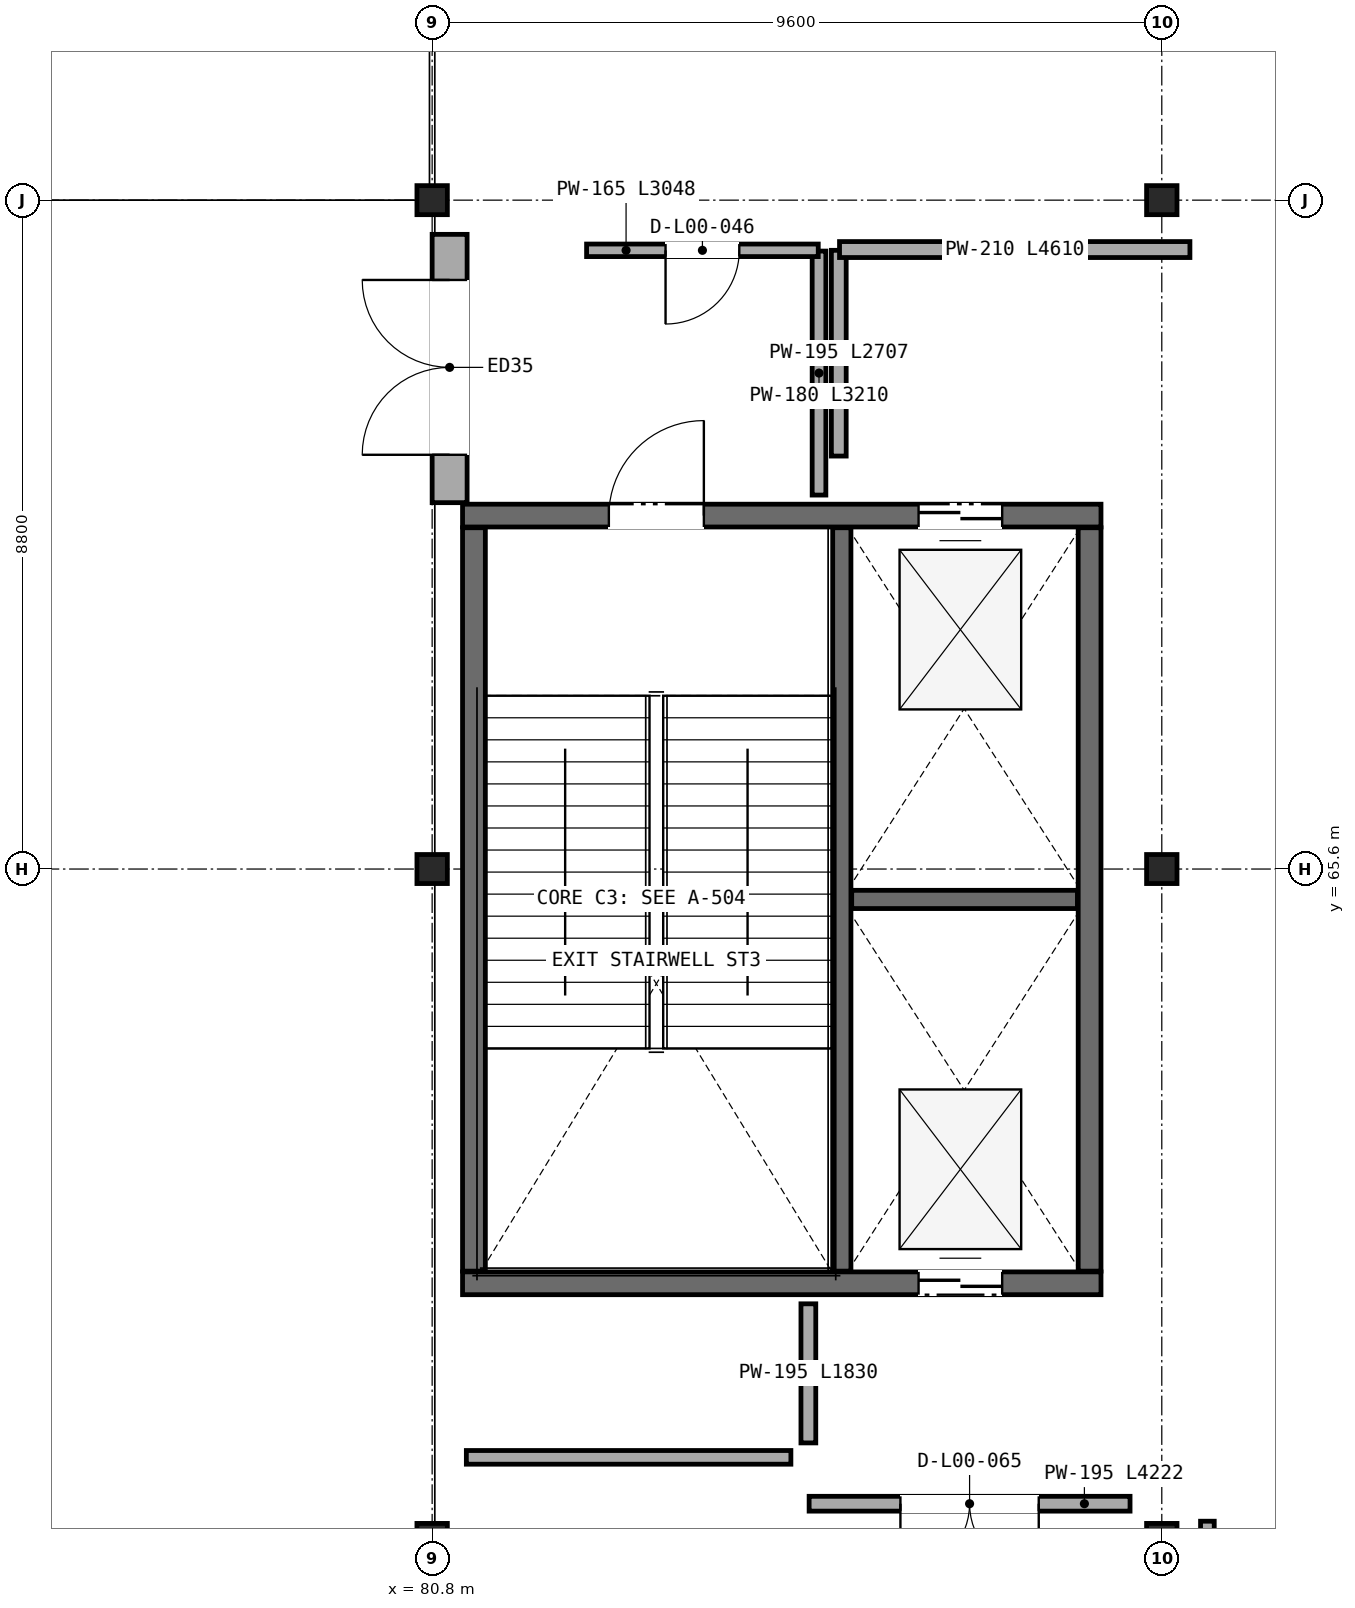
"""IFC4 building model, lengths in metres.
Left out: names, types, materials, properties, quantities, classifications, styles, units other than length and angle.
Written with IfcOpenShell. Run it as: python <this file> out.ifc"""

import sys

from ifc_helpers import new_model, si_unit, direction, frame, frame_2d, origin, origin_2d, place, context, subcontext, project, spatial, rectangle, i_section, extrude, element, fill, save


model = new_model("IFC4")
c1 = context("Model", 3, precision=1e-05, world=origin(), true_north=direction((0.0, 1.0)))
c2 = subcontext(c1, "Body", "Model", "MODEL_VIEW")
j1 = project(units=[si_unit("LENGTHUNIT", "METRE"), si_unit("PLANEANGLEUNIT", "RADIAN")], contexts=[c1])
p1 = place(None, origin())
s1 = spatial("IfcSite", under=j1, at=p1, CompositionType="ELEMENT")
p2 = place(p1, origin())
s2 = spatial("IfcBuilding", under=s1, at=p2, CompositionType="ELEMENT")
p3 = place(p2, origin())
s3 = spatial("IfcBuildingStorey", under=s2, at=p3, CompositionType="ELEMENT", Elevation=0.0)
for number, where, z_axis, x_axis in (
    (1, (90.4, 56.8, 0.0), (0.0, 0.0, 1.0), (1.0, 0.0, 0.0)),
    (2, (90.4, 65.6, 0.0), (0.0, 0.0, 1.0), (1.0, 0.0, 0.0)),
    (3, (90.4, 74.4, 0.0), (0.0, 0.0, 1.0), (1.0, 0.0, 0.0)),
    (4, (80.8, 56.8, 0.0), (0.0, 0.0, 1.0), (1.0, 0.0, 0.0)),
    (5, (80.8, 65.6, 0.0), (0.0, 0.0, 1.0), (1.0, 0.0, 0.0)),
    (6, (80.8, 74.4, 0.0), (0.0, 0.0, 1.0), (1.0, 0.0, 0.0)),
):
    element("IfcColumn", number, at=place(p3, frame(where, z_axis=z_axis, x_axis=x_axis)), inside=s3, PredefinedType="COLUMN", context=c2, shape_type="SweptSolid", body=[
        extrude(i_section(OverallWidth=0.4, OverallDepth=0.382, WebThickness=0.025, FlangeThickness=0.036, at=origin_2d()), origin(), (0.0, 0.0, 1.0), 5.6),
    ])
p4 = place(p3, frame((81.03, 73.95, 0.0), z_axis=(0.0, 0.0, 1.0), x_axis=(0.0, -1.0, 0.0)))
e7 = element("IfcWall", 7, at=p4, inside=s3, PredefinedType="SOLIDWALL", context=c2, shape_type="SweptSolid", body=[
    extrude(rectangle(XDim=3.53, YDim=0.46, at=frame_2d((1.765, 0.0))), origin(), (0.0, 0.0, 1.0), 4.8),
])
p5 = place(p4, frame((0.6, 0.0, 0.0)))
e8 = element("IfcOpeningElement", 8, at=p5, cuts=e7, PredefinedType="OPENING", context=c2, shape_type="SweptSolid", body=[
    extrude(rectangle(XDim=2.3, YDim=2.4, at=frame_2d((1.15, 1.2))), frame((0.0, 0.24, 0.0), z_axis=(0.0, -1.0, 0.0), x_axis=(1.0, 0.0, 0.0)), (0.0, 0.0, 1.0), 0.48),
])
p6 = place(p3, frame((81.2, 60.15, 0.0), z_axis=(0.0, 0.0, 1.0), x_axis=(1.0, 0.0, 0.0)))
e9 = element("IfcWall", 9, at=p6, inside=s3, PredefinedType="SHEAR", context=c2, shape_type="SweptSolid", body=[
    extrude(rectangle(XDim=8.4, YDim=0.3, at=frame_2d((4.2, 0.0))), origin(), (0.0, 0.0, 1.0), 5.345),
])
p7 = place(p6, frame((6.0, 0.0, 0.0)))
e10 = element("IfcOpeningElement", 10, at=p7, cuts=e9, PredefinedType="OPENING", context=c2, shape_type="SweptSolid", body=[
    extrude(rectangle(XDim=1.1, YDim=2.2, at=frame_2d((0.55, 1.1))), frame((0.0, 0.16, 0.0), z_axis=(0.0, -1.0, 0.0), x_axis=(1.0, 0.0, 0.0)), (0.0, 0.0, 1.0), 0.32),
])
p8 = place(p3, frame((89.6, 70.25, 0.0), z_axis=(0.0, 0.0, 1.0), x_axis=(-1.0, 0.0, 0.0)))
e11 = element("IfcWall", 11, at=p8, inside=s3, PredefinedType="SHEAR", context=c2, shape_type="SweptSolid", body=[
    extrude(rectangle(XDim=8.4, YDim=0.3, at=frame_2d((4.2, 0.0))), origin(), (0.0, 0.0, 1.0), 5.345),
])
p9 = place(p8, frame((5.225, 0.0, 0.0)))
e12 = element("IfcOpeningElement", 12, at=p9, cuts=e11, PredefinedType="OPENING", context=c2, shape_type="SweptSolid", body=[
    extrude(rectangle(XDim=1.25, YDim=2.2, at=frame_2d((0.625, 1.1))), frame((0.0, 0.16, 0.0), z_axis=(0.0, -1.0, 0.0), x_axis=(1.0, 0.0, 0.0)), (0.0, 0.0, 1.0), 0.32),
])
p10 = place(p8, frame((1.3, 0.0, 0.0)))
e13 = element("IfcOpeningElement", 13, at=p10, cuts=e11, PredefinedType="OPENING", context=c2, shape_type="SweptSolid", body=[
    extrude(rectangle(XDim=1.1, YDim=2.2, at=frame_2d((0.55, 1.1))), frame((0.0, 0.16, 0.0), z_axis=(0.0, -1.0, 0.0), x_axis=(1.0, 0.0, 0.0)), (0.0, 0.0, 1.0), 0.32),
])
for number, where, z_axis, x_axis in (
    (14, (89.45, 60.31, 0.0), (0.0, 0.0, 1.0), (0.0, 1.0, 0.0)),
    (15, (81.35, 70.09, 0.0), (0.0, 0.0, 1.0), (0.0, -1.0, 0.0)),
):
    element("IfcWall", number, at=place(p3, frame(where, z_axis=z_axis, x_axis=x_axis)), inside=s3, PredefinedType="SHEAR", context=c2, shape_type="SweptSolid", body=[
        extrude(rectangle(XDim=9.78, YDim=0.3, at=frame_2d((4.89, 0.0))), origin(), (0.0, 0.0, 1.0), 5.345),
    ])
p11 = place(p3, frame((86.19, 60.31, 0.0), z_axis=(0.0, 0.0, 1.0), x_axis=(0.0, 1.0, 0.0)))
e16 = element("IfcWall", 16, at=p11, inside=s3, PredefinedType="SOLIDWALL", context=c2, shape_type="SweptSolid", body=[
    extrude(rectangle(XDim=9.78, YDim=0.24, at=frame_2d((4.89, 0.0))), origin(), (0.0, 0.0, 1.0), 5.345),
])
p12 = place(p3, frame((86.32, 65.2, 0.0), z_axis=(0.0, 0.0, 1.0), x_axis=(1.0, 0.0, 0.0)))
e17 = element("IfcWall", 17, at=p12, inside=s3, PredefinedType="SOLIDWALL", context=c2, shape_type="SweptSolid", body=[
    extrude(rectangle(XDim=2.97, YDim=0.24, at=frame_2d((1.485, 0.0))), origin(), (0.0, 0.0, 1.0), 5.345),
])
p13 = place(p3, frame((86.15, 73.74, 0.0), z_axis=(0.0, 0.0, 1.0), x_axis=(0.0, -1.0, 0.0)))
e18 = element("IfcWall", 18, at=p13, inside=s3, PredefinedType="PARTITIONING", context=c2, shape_type="SweptSolid", body=[
    extrude(rectangle(XDim=2.707, YDim=0.195, at=frame_2d((1.354, 0.0))), origin(), (0.0, 0.0, 1.0), 5.23),
])
p14 = place(p3, frame((85.89, 70.52, 0.0), z_axis=(0.0, 0.0, 1.0), x_axis=(0.0, 1.0, 0.0)))
e19 = element("IfcWall", 19, at=p14, inside=s3, PredefinedType="PARTITIONING", context=c2, shape_type="SweptSolid", body=[
    extrude(rectangle(XDim=3.21, YDim=0.18, at=frame_2d((1.605, 0.0))), origin(), (0.0, 0.0, 1.0), 5.23),
])
p15 = place(p3, frame((85.88, 73.74, 0.0), z_axis=(0.0, 0.0, 1.0), x_axis=(-1.0, 0.0, 0.0)))
e20 = element("IfcWall", 20, at=p15, inside=s3, PredefinedType="PARTITIONING", context=c2, shape_type="SweptSolid", body=[
    extrude(rectangle(XDim=3.048, YDim=0.165, at=frame_2d((1.524, 0.0))), origin(), (0.0, 0.0, 1.0), 5.23),
])
p16 = place(p15, frame((1.039, 0.0, 0.0)))
e21 = element("IfcOpeningElement", 21, at=p16, cuts=e20, PredefinedType="OPENING", context=c2, shape_type="SweptSolid", body=[
    extrude(rectangle(XDim=0.97, YDim=2.16, at=frame_2d((0.485, 1.08))), frame((0.0, 0.093, 0.0), z_axis=(0.0, -1.0, 0.0), x_axis=(1.0, 0.0, 0.0)), (0.0, 0.0, 1.0), 0.185),
])
p17 = place(p3, frame((85.76, 57.25, 0.0), z_axis=(0.0, 0.0, 1.0), x_axis=(1.0, 0.0, 0.0)))
e22 = element("IfcWall", 22, at=p17, inside=s3, PredefinedType="PARTITIONING", context=c2, shape_type="SweptSolid", body=[
    extrude(rectangle(XDim=4.222, YDim=0.195, at=frame_2d((2.111, 0.0))), origin(), (0.0, 0.0, 1.0), 5.23),
])
p18 = place(p17, frame((1.201, 0.0, 0.0)))
e23 = element("IfcOpeningElement", 23, at=p18, cuts=e22, PredefinedType="OPENING", context=c2, shape_type="SweptSolid", body=[
    extrude(rectangle(XDim=1.82, YDim=2.34, at=frame_2d((0.91, 1.17))), frame((0.0, 0.107, 0.0), z_axis=(0.0, -1.0, 0.0), x_axis=(1.0, 0.0, 0.0)), (0.0, 0.0, 1.0), 0.215),
])
p19 = place(p3, frame((91.0, 57.02, 0.0), z_axis=(0.0, 0.0, 1.0), x_axis=(0.0, -1.0, 0.0)))
e24 = element("IfcWall", 24, at=p19, inside=s3, PredefinedType="PARTITIONING", context=c2, shape_type="SweptSolid", body=[
    extrude(rectangle(XDim=2.54, YDim=0.18, at=frame_2d((1.27, 0.0))), origin(), (0.0, 0.0, 1.0), 4.708),
])
p20 = place(p3, frame((90.77, 73.75, 0.0), z_axis=(0.0, 0.0, 1.0), x_axis=(-1.0, 0.0, 0.0)))
e25 = element("IfcWall", 25, at=p20, inside=s3, PredefinedType="PARTITIONING", context=c2, shape_type="SweptSolid", body=[
    extrude(rectangle(XDim=4.61, YDim=0.21, at=frame_2d((2.305, 0.0))), origin(), (0.0, 0.0, 1.0), 4.787),
])
p21 = place(p3, frame((85.75, 59.88, 0.0), z_axis=(0.0, 0.0, 1.0), x_axis=(0.0, -1.0, 0.0)))
e26 = element("IfcWall", 26, at=p21, inside=s3, PredefinedType="PARTITIONING", context=c2, shape_type="SweptSolid", body=[
    extrude(rectangle(XDim=1.83, YDim=0.195, at=frame_2d((0.915, 0.0))), origin(), (0.0, 0.0, 1.0), 5.23),
])
p22 = place(p3, frame((81.25, 57.86, 0.0), z_axis=(0.0, 0.0, 1.0), x_axis=(1.0, 0.0, 0.0)))
e27 = element("IfcWall", 27, at=p22, inside=s3, PredefinedType="PARTITIONING", context=c2, shape_type="SweptSolid", body=[
    extrude(rectangle(XDim=4.27, YDim=0.18, at=frame_2d((2.135, 0.0))), origin(), (0.0, 0.0, 1.0), 5.23),
])
p23 = place(p5, frame((2.3, 0.0, 0.0), z_axis=(0.0, 0.0, 1.0), x_axis=(-1.0, 0.0, 0.0)))
e28 = element("IfcDoor", 28, at=p23, inside=s3, OperationType="DOUBLE_DOOR_SINGLE_SWING", PredefinedType="DOOR", context=c2, shape_type="SweptSolid", body=[
    extrude(rectangle(XDim=2.3, YDim=2.4, at=frame_2d((1.15, 1.2))), frame((0.0, 0.025, 0.0), z_axis=(0.0, -1.0, 0.0), x_axis=(1.0, 0.0, 0.0)), (0.0, 0.0, 1.0), 0.05),
])
fill(e8, e28)
p24 = place(p9, frame((1.25, 0.0, 0.0), z_axis=(0.0, 0.0, 1.0), x_axis=(-1.0, 0.0, 0.0)))
e29 = element("IfcDoor", 29, at=p24, inside=s3, OperationType="SINGLE_SWING_LEFT", PredefinedType="DOOR", context=c2, shape_type="SweptSolid", body=[
    extrude(rectangle(XDim=1.25, YDim=2.2, at=frame_2d((0.625, 1.1))), frame((0.0, 0.025, 0.0), z_axis=(0.0, -1.0, 0.0), x_axis=(1.0, 0.0, 0.0)), (0.0, 0.0, 1.0), 0.05),
])
fill(e12, e29)
p25 = place(p7, origin())
e30 = element("IfcDoor", 30, at=p25, inside=s3, OperationType="DOUBLE_DOOR_SLIDING", PredefinedType="DOOR", context=c2, shape_type="SweptSolid", body=[
    extrude(rectangle(XDim=1.1, YDim=2.2, at=frame_2d((0.55, 1.1))), frame((0.0, 0.025, 0.0), z_axis=(0.0, -1.0, 0.0), x_axis=(1.0, 0.0, 0.0)), (0.0, 0.0, 1.0), 0.05),
])
fill(e10, e30)
p26 = place(p10, origin())
e31 = element("IfcDoor", 31, at=p26, inside=s3, OperationType="DOUBLE_DOOR_SLIDING", PredefinedType="DOOR", context=c2, shape_type="SweptSolid", body=[
    extrude(rectangle(XDim=1.1, YDim=2.2, at=frame_2d((0.55, 1.1))), frame((0.0, 0.025, 0.0), z_axis=(0.0, -1.0, 0.0), x_axis=(1.0, 0.0, 0.0)), (0.0, 0.0, 1.0), 0.05),
])
fill(e13, e31)
p27 = place(p16, origin())
e32 = element("IfcDoor", 32, at=p27, inside=s3, OperationType="SINGLE_SWING_RIGHT", PredefinedType="DOOR", context=c2, shape_type="SweptSolid", body=[
    extrude(rectangle(XDim=0.97, YDim=2.16, at=frame_2d((0.485, 1.08))), frame((0.0, 0.025, 0.0), z_axis=(0.0, -1.0, 0.0), x_axis=(1.0, 0.0, 0.0)), (0.0, 0.0, 1.0), 0.05),
])
fill(e21, e32)
p28 = place(p18, frame((1.82, 0.0, 0.0), z_axis=(0.0, 0.0, 1.0), x_axis=(-1.0, 0.0, 0.0)))
e33 = element("IfcDoor", 33, at=p28, inside=s3, OperationType="DOUBLE_DOOR_SINGLE_SWING", PredefinedType="DOOR", context=c2, shape_type="SweptSolid", body=[
    extrude(rectangle(XDim=1.82, YDim=2.34, at=frame_2d((0.91, 1.17))), frame((0.0, 0.025, 0.0), z_axis=(0.0, -1.0, 0.0), x_axis=(1.0, 0.0, 0.0)), (0.0, 0.0, 1.0), 0.05),
])
fill(e23, e33)
save(model, sys.argv[1])
